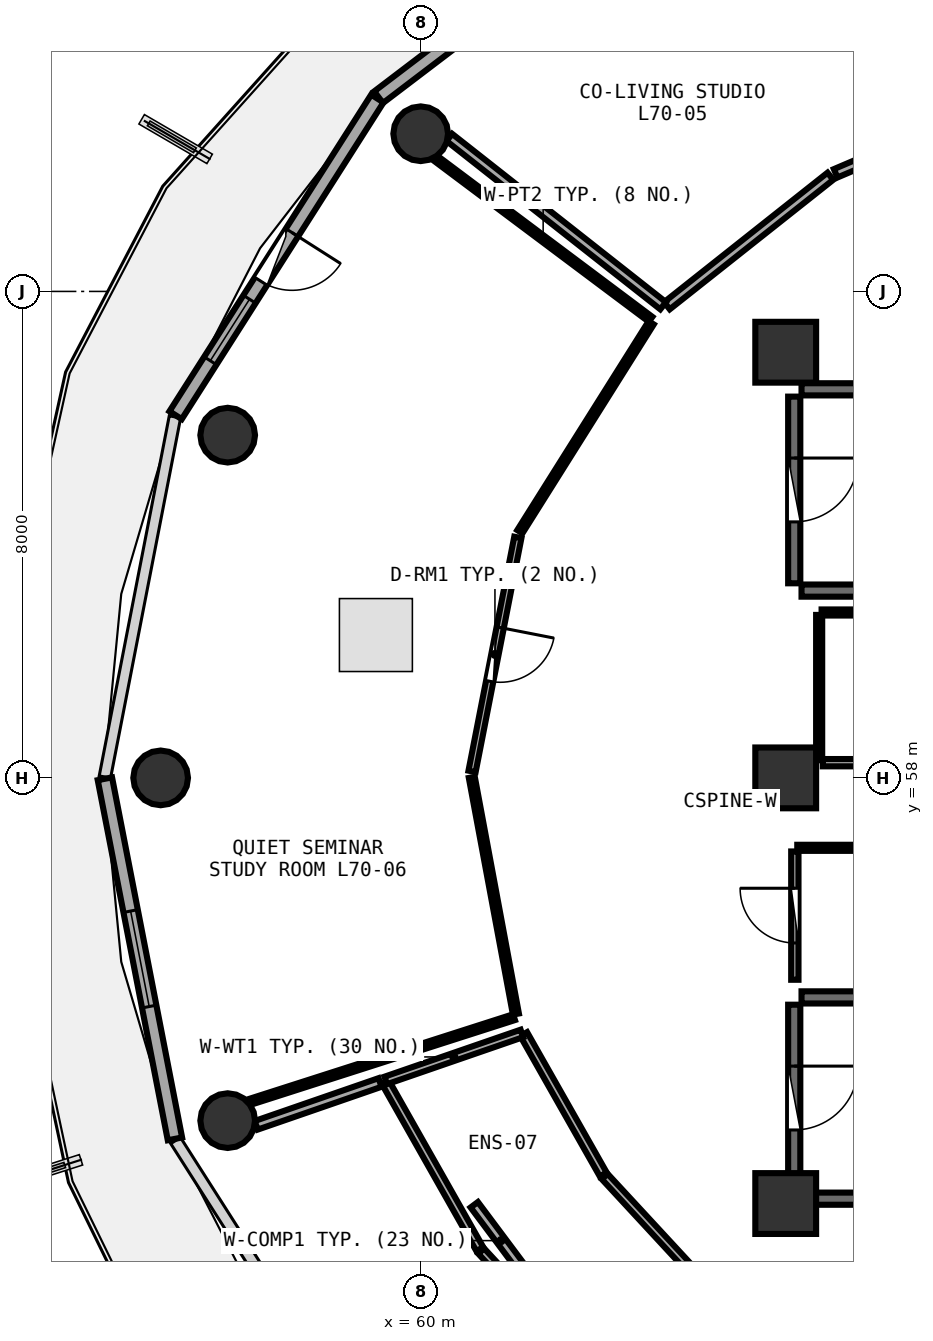
"""IFC4 building model, lengths in metres.
Left out: names, types, materials, properties, quantities, classifications, styles, units other than length and angle.
Written with IfcOpenShell. Run it as: python <this file> out.ifc"""

import sys

from ifc_helpers import new_model, si_unit, direction, frame, frame_2d, origin, origin_2d, place, context, subcontext, project, spatial, rectangle, circle, extrude, element, fill, save


model = new_model("IFC4")
c1 = context("Model", 3, precision=1e-05, world=origin(), true_north=direction((0.0, 1.0)))
c2 = subcontext(c1, "Body", "Model", "MODEL_VIEW")
j1 = project(units=[si_unit("LENGTHUNIT", "METRE"), si_unit("PLANEANGLEUNIT", "RADIAN")], contexts=[c1])
p1 = place(None, origin())
s1 = spatial("IfcSite", under=j1, at=p1, CompositionType="ELEMENT")
p2 = place(p1, origin())
s2 = spatial("IfcBuilding", under=s1, at=p2, CompositionType="ELEMENT")
p3 = place(p2, frame((0.0, 0.0, 274.95)))
s3 = spatial("IfcBuildingStorey", under=s2, at=p3, CompositionType="ELEMENT", Elevation=274.95)
for number, where, z_axis, x_axis in (
    (1, (66.0, 51.0, 0.0), (0.0, 0.0, 1.0), (1.0, 0.0, 0.0)),
    (2, (66.0, 65.0, 0.0), (0.0, 0.0, 1.0), (1.0, 0.0, 0.0)),
    (3, (66.0, 58.0, 0.0), (0.0, 0.0, 1.0), (1.0, 0.0, 0.0)),
):
    element("IfcColumn", number, at=place(p3, frame(where, z_axis=z_axis, x_axis=x_axis)), inside=s3, PredefinedType="PILASTER", context=c2, shape_type="SweptSolid", body=[
        extrude(rectangle(XDim=1.0, YDim=1.0, at=origin_2d()), origin(), (0.0, 0.0, 1.0), 3.75),
    ])
for number, where, z_axis, x_axis in (
    (4, (59.997, 68.593, 0.0), (0.0, 0.0, 1.0), (1.0, 0.0, 0.0)),
    (5, (56.823, 63.636, 0.0), (0.0, 0.0, 1.0), (1.0, 0.0, 0.0)),
    (6, (55.72, 58.0, 0.0), (0.0, 0.0, 1.0), (1.0, 0.0, 0.0)),
    (7, (56.823, 52.364, 0.0), (0.0, 0.0, 1.0), (1.0, 0.0, 0.0)),
):
    element("IfcColumn", number, at=place(p3, frame(where, z_axis=z_axis, x_axis=x_axis)), inside=s3, PredefinedType="COLUMN", context=c2, shape_type="SweptSolid", body=[
        extrude(circle(Radius=0.45, at=origin_2d()), origin(), (0.0, 0.0, 1.0), 3.75),
    ])
p4 = place(p3, frame((64.388, 73.06, 0.0), z_axis=(0.0, 0.0, 1.0), x_axis=(-0.796010444211, -0.605282886514, 0.0)))
e8 = element("IfcWall", 8, at=p4, inside=s3, PredefinedType="SOLIDWALL", context=c2, shape_type="SweptSolid", body=[
    extrude(rectangle(XDim=6.387, YDim=0.24, at=frame_2d((3.194, 0.0))), origin(), (0.0, 0.0, 1.0), 3.475),
])
p5 = place(p4, frame((2.394, 0.0, 0.85)))
e9 = element("IfcOpeningElement", 9, at=p5, cuts=e8, PredefinedType="OPENING", context=c2, shape_type="SweptSolid", body=[
    extrude(rectangle(XDim=1.6, YDim=1.45, at=frame_2d((0.8, 0.725))), frame((0.0, 0.13, 0.0), z_axis=(0.0, -1.0, 0.0), x_axis=(1.0, 0.0, 0.0)), (0.0, 0.0, 1.0), 0.26),
])
p6 = place(p3, frame((59.284, 69.172, 0.0), z_axis=(0.0, 0.0, 1.0), x_axis=(-0.537271968456, -0.843409053728, 0.0)))
e10 = element("IfcWall", 10, at=p6, inside=s3, PredefinedType="SOLIDWALL", context=c2, shape_type="SweptSolid", body=[
    extrude(rectangle(XDim=6.175, YDim=0.24, at=frame_2d((3.087, 0.0))), origin(), (0.0, 0.0, 1.0), 3.475),
])
p7 = place(p6, frame((2.613, 0.0, 0.0)))
e11 = element("IfcOpeningElement", 11, at=p7, cuts=e10, PredefinedType="OPENING", context=c2, shape_type="SweptSolid", body=[
    extrude(rectangle(XDim=0.95, YDim=2.1, at=frame_2d((0.475, 1.05))), frame((0.0, 0.13, 0.0), z_axis=(0.0, -1.0, 0.0), x_axis=(1.0, 0.0, 0.0)), (0.0, 0.0, 1.0), 0.26),
])
p8 = place(p6, frame((3.913, 0.0, 0.85)))
e12 = element("IfcOpeningElement", 12, at=p8, cuts=e10, PredefinedType="OPENING", context=c2, shape_type="SweptSolid", body=[
    extrude(rectangle(XDim=1.2, YDim=1.45, at=frame_2d((0.6, 0.725))), frame((0.0, 0.13, 0.0), z_axis=(0.0, -1.0, 0.0), x_axis=(1.0, 0.0, 0.0)), (0.0, 0.0, 1.0), 0.26),
])
p9 = place(p3, frame((54.803, 57.985, 0.0), z_axis=(0.0, 0.0, 1.0), x_axis=(0.190969309115, -0.981596008028, 0.0)))
e13 = element("IfcWall", 13, at=p9, inside=s3, PredefinedType="SOLIDWALL", context=c2, shape_type="SweptSolid", body=[
    extrude(rectangle(XDim=6.033, YDim=0.24, at=frame_2d((3.017, 0.0))), origin(), (0.0, 0.0, 1.0), 3.475),
])
p10 = place(p9, frame((2.216, 0.0, 0.85)))
e14 = element("IfcOpeningElement", 14, at=p10, cuts=e13, PredefinedType="OPENING", context=c2, shape_type="SweptSolid", body=[
    extrude(rectangle(XDim=1.6, YDim=1.45, at=frame_2d((0.8, 0.725))), frame((0.0, 0.13, 0.0), z_axis=(0.0, -1.0, 0.0), x_axis=(1.0, 0.0, 0.0)), (0.0, 0.0, 1.0), 0.26),
])
for number, where, z_axis, x_axis in (
    (15, (66.26, 61.08, 0.0), (0.0, 0.0, 1.0), (1.0, 0.0, 0.0)),
    (16, (73.42, 64.39, 0.0), (0.0, 0.0, 1.0), (-1.0, 0.0, 0.0)),
):
    element("IfcWall", number, at=place(p3, frame(where, z_axis=z_axis, x_axis=x_axis)), inside=s3, PredefinedType="SHEAR", context=c2, shape_type="SweptSolid", body=[
        extrude(rectangle(XDim=7.16, YDim=0.2, at=frame_2d((3.58, 0.0))), origin(), (0.0, 0.0, 1.0), 3.49),
    ])
p11 = place(p3, frame((66.14, 64.27, 0.0), z_axis=(0.0, 0.0, 1.0), x_axis=(0.0, -1.0, 0.0)))
e17 = element("IfcWall", 17, at=p11, inside=s3, PredefinedType="SHEAR", context=c2, shape_type="SweptSolid", body=[
    extrude(rectangle(XDim=3.07, YDim=0.2, at=frame_2d((1.535, 0.0))), origin(), (0.0, 0.0, 1.0), 3.49),
])
p12 = place(p11, frame((1.01, 0.0, 0.0)))
e18 = element("IfcOpeningElement", 18, at=p12, cuts=e17, PredefinedType="OPENING", context=c2, shape_type="SweptSolid", body=[
    extrude(rectangle(XDim=1.05, YDim=2.1, at=frame_2d((0.525, 1.05))), frame((0.0, 0.11, 0.0), z_axis=(0.0, -1.0, 0.0), x_axis=(1.0, 0.0, 0.0)), (0.0, 0.0, 1.0), 0.22),
])
for number, where, z_axis, x_axis in (
    (19, (66.26, 51.08, 0.0), (0.0, 0.0, 1.0), (1.0, 0.0, 0.0)),
    (20, (73.42, 54.39, 0.0), (0.0, 0.0, 1.0), (-1.0, 0.0, 0.0)),
):
    element("IfcWall", number, at=place(p3, frame(where, z_axis=z_axis, x_axis=x_axis)), inside=s3, PredefinedType="SHEAR", context=c2, shape_type="SweptSolid", body=[
        extrude(rectangle(XDim=7.16, YDim=0.2, at=frame_2d((3.58, 0.0))), origin(), (0.0, 0.0, 1.0), 3.49),
    ])
p13 = place(p3, frame((66.14, 54.27, 0.0), z_axis=(0.0, 0.0, 1.0), x_axis=(0.0, -1.0, 0.0)))
e21 = element("IfcWall", 21, at=p13, inside=s3, PredefinedType="SHEAR", context=c2, shape_type="SweptSolid", body=[
    extrude(rectangle(XDim=3.07, YDim=0.2, at=frame_2d((1.535, 0.0))), origin(), (0.0, 0.0, 1.0), 3.49),
])
p14 = place(p13, frame((1.01, 0.0, 0.0)))
e22 = element("IfcOpeningElement", 22, at=p14, cuts=e21, PredefinedType="OPENING", context=c2, shape_type="SweptSolid", body=[
    extrude(rectangle(XDim=1.05, YDim=2.1, at=frame_2d((0.525, 1.05))), frame((0.0, 0.11, 0.0), z_axis=(0.0, -1.0, 0.0), x_axis=(1.0, 0.0, 0.0)), (0.0, 0.0, 1.0), 0.22),
])
p15 = place(p3, frame((66.61, 58.25, 0.0), z_axis=(0.0, 0.0, 1.0), x_axis=(1.0, 0.0, 0.0)))
e23 = element("IfcWall", 23, at=p15, inside=s3, PredefinedType="PARTITIONING", context=c2, shape_type="SweptSolid", body=[
    extrude(rectangle(XDim=5.78, YDim=0.12, at=frame_2d((2.89, 0.0))), origin(), (0.0, 0.0, 1.0), 3.48),
])
p16 = place(p15, frame((2.44, 0.0, 0.0)))
e24 = element("IfcOpeningElement", 24, at=p16, cuts=e23, PredefinedType="OPENING", context=c2, shape_type="SweptSolid", body=[
    extrude(rectangle(XDim=0.9, YDim=2.08, at=frame_2d((0.45, 1.04))), frame((0.0, 0.07, 0.0), z_axis=(0.0, -1.0, 0.0), x_axis=(1.0, 0.0, 0.0)), (0.0, 0.0, 1.0), 0.14),
])
p17 = place(p3, frame((66.15, 54.68, 0.0), z_axis=(0.0, 0.0, 1.0), x_axis=(0.0, 1.0, 0.0)))
e25 = element("IfcWall", 25, at=p17, inside=s3, PredefinedType="PARTITIONING", context=c2, shape_type="SweptSolid", body=[
    extrude(rectangle(XDim=2.11, YDim=0.12, at=frame_2d((1.055, 0.0))), origin(), (0.0, 0.0, 1.0), 2.775),
])
p18 = place(p17, frame((0.605, 0.0, 0.0)))
e26 = element("IfcOpeningElement", 26, at=p18, cuts=e25, PredefinedType="OPENING", context=c2, shape_type="SweptSolid", body=[
    extrude(rectangle(XDim=0.9, YDim=2.08, at=frame_2d((0.45, 1.04))), frame((0.0, 0.07, 0.0), z_axis=(0.0, -1.0, 0.0), x_axis=(1.0, 0.0, 0.0)), (0.0, 0.0, 1.0), 0.14),
])
p19 = place(p3, frame((70.021, 69.308, 0.0), z_axis=(0.0, 0.0, 1.0), x_axis=(-0.919764656354, -0.392470351647, 0.0)))
e27 = element("IfcWall", 27, at=p19, inside=s3, PredefinedType="PARTITIONING", context=c2, shape_type="SweptSolid", body=[
    extrude(rectangle(XDim=3.479, YDim=0.15, at=frame_2d((1.739, 0.0))), origin(), (0.0, 0.0, 1.0), 3.235),
])
p20 = place(p19, frame((1.264, 0.0, 0.0)))
e28 = element("IfcOpeningElement", 28, at=p20, cuts=e27, PredefinedType="OPENING", context=c2, shape_type="SweptSolid", body=[
    extrude(rectangle(XDim=0.95, YDim=2.08, at=frame_2d((0.475, 1.04))), frame((0.0, 0.085, 0.0), z_axis=(0.0, -1.0, 0.0), x_axis=(1.0, 0.0, 0.0)), (0.0, 0.0, 1.0), 0.17),
])
p21 = place(p3, frame((61.594, 61.955, 0.0), z_axis=(0.0, 0.0, 1.0), x_axis=(-0.192019428236, -0.981391124466, 0.0)))
e29 = element("IfcWall", 29, at=p21, inside=s3, PredefinedType="PARTITIONING", context=c2, shape_type="SweptSolid", body=[
    extrude(rectangle(XDim=3.921, YDim=0.12, at=frame_2d((1.96, 0.0))), origin(), (0.0, 0.0, 1.0), 3.075),
])
p22 = place(p21, frame((1.511, 0.0, 0.0)))
e30 = element("IfcOpeningElement", 30, at=p22, cuts=e29, PredefinedType="OPENING", context=c2, shape_type="SweptSolid", body=[
    extrude(rectangle(XDim=0.9, YDim=2.08, at=frame_2d((0.45, 1.04))), frame((0.0, 0.07, 0.0), z_axis=(0.0, -1.0, 0.0), x_axis=(1.0, 0.0, 0.0)), (0.0, 0.0, 1.0), 0.14),
])
p23 = place(p3, frame((72.41, 60.72, 0.0), z_axis=(0.0, 0.0, 1.0), x_axis=(-1.0, 0.0, 0.0)))
e31 = element("IfcWall", 31, at=p23, inside=s3, PredefinedType="PARTITIONING", context=c2, shape_type="SweptSolid", body=[
    extrude(rectangle(XDim=5.82, YDim=0.1, at=frame_2d((2.91, 0.0))), origin(), (0.0, 0.0, 1.0), 3.48),
])
p24 = place(p3, frame((66.55, 60.68, 0.0), z_axis=(0.0, 0.0, 1.0), x_axis=(0.0, -1.0, 0.0)))
e32 = element("IfcWall", 32, at=p24, inside=s3, PredefinedType="PARTITIONING", context=c2, shape_type="SweptSolid", body=[
    extrude(rectangle(XDim=2.39, YDim=0.1, at=frame_2d((1.195, 0.0))), origin(), (0.0, 0.0, 1.0), 3.48),
])
p25 = place(p3, frame((71.76, 56.85, 0.0), z_axis=(0.0, 0.0, 1.0), x_axis=(-1.0, 0.0, 0.0)))
e33 = element("IfcWall", 33, at=p25, inside=s3, PredefinedType="PARTITIONING", context=c2, shape_type="SweptSolid", body=[
    extrude(rectangle(XDim=5.57, YDim=0.1, at=frame_2d((2.785, 0.0))), origin(), (0.0, 0.0, 1.0), 2.775),
])
p26 = place(p3, frame((66.735, 67.894, 0.0), z_axis=(0.0, 0.0, 1.0), x_axis=(-0.78387401132, -0.620919909793, 0.0)))
e34 = element("IfcWall", 34, at=p26, inside=s3, PredefinedType="PARTITIONING", context=c2, shape_type="SweptSolid", body=[
    extrude(rectangle(XDim=3.429, YDim=0.15, at=frame_2d((1.715, 0.0))), origin(), (0.0, 0.0, 1.0), 3.075),
])
p27 = place(p3, frame((63.984, 65.765, 0.0), z_axis=(0.0, 0.0, 1.0), x_axis=(-0.785736749878, 0.618561039745, 0.0)))
e35 = element("IfcWall", 35, at=p27, inside=s3, PredefinedType="PARTITIONING", context=c2, shape_type="SweptSolid", body=[
    extrude(rectangle(XDim=4.475, YDim=0.15, at=frame_2d((2.237, 0.0))), origin(), (0.0, 0.0, 1.0), 3.075),
])
p28 = place(p3, frame((63.788, 65.484, 0.0), z_axis=(0.0, 0.0, 1.0), x_axis=(-0.532251611419, -0.846586216603, 0.0)))
e36 = element("IfcWall", 36, at=p28, inside=s3, PredefinedType="PARTITIONING", context=c2, shape_type="SweptSolid", body=[
    extrude(rectangle(XDim=4.059, YDim=0.1, at=frame_2d((2.03, 0.0))), origin(), (0.0, 0.0, 1.0), 3.075),
])
p29 = place(p3, frame((60.837, 58.009, 0.0), z_axis=(0.0, 0.0, 1.0), x_axis=(0.18318648267, -0.983078182327, 0.0)))
e37 = element("IfcWall", 37, at=p29, inside=s3, PredefinedType="PARTITIONING", context=c2, shape_type="SweptSolid", body=[
    extrude(rectangle(XDim=3.959, YDim=0.1, at=frame_2d((1.98, 0.0))), origin(), (0.0, 0.0, 1.0), 3.075),
])
p30 = place(p3, frame((61.532, 54.065, 0.0), z_axis=(0.0, 0.0, 1.0), x_axis=(-0.95227750557, -0.305233602976, 0.0)))
e38 = element("IfcWall", 38, at=p30, inside=s3, PredefinedType="PARTITIONING", context=c2, shape_type="SweptSolid", body=[
    extrude(rectangle(XDim=4.565, YDim=0.1, at=frame_2d((2.283, 0.0))), origin(), (0.0, 0.0, 1.0), 3.175),
])
p31 = place(p3, frame((60.244, 68.188, 0.0), z_axis=(0.0, 0.0, 1.0), x_axis=(0.800384816546, -0.599486568191, 0.0)))
e39 = element("IfcWall", 39, at=p31, inside=s3, PredefinedType="PARTITIONING", context=c2, shape_type="SweptSolid", body=[
    extrude(rectangle(XDim=4.414, YDim=0.1, at=frame_2d((2.207, 0.0))), origin(), (0.0, 0.0, 1.0), 3.175),
])
p32 = place(p3, frame((61.69, 53.787, 0.0), z_axis=(0.0, 0.0, 1.0), x_axis=(0.493265362099, -0.86987888959, 0.0)))
e40 = element("IfcWall", 40, at=p32, inside=s3, PredefinedType="PLUMBINGWALL", context=c2, shape_type="SweptSolid", body=[
    extrude(rectangle(XDim=2.656, YDim=0.13, at=frame_2d((1.328, 0.0))), origin(), (0.0, 0.0, 1.0), 3.075),
])
p33 = place(p3, frame((63.024, 51.444, 0.0), z_axis=(0.0, 0.0, 1.0), x_axis=(0.678981447207, -0.734155429285, 0.0)))
e41 = element("IfcWall", 41, at=p33, inside=s3, PredefinedType="PLUMBINGWALL", context=c2, shape_type="SweptSolid", body=[
    extrude(rectangle(XDim=2.717, YDim=0.13, at=frame_2d((1.358, 0.0))), origin(), (0.0, 0.0, 1.0), 3.075),
])
p34 = place(p3, frame((63.183, 47.845, 0.0), z_axis=(0.0, 0.0, 1.0), x_axis=(-0.678233011032, 0.734846911095, 0.0)))
e42 = element("IfcWall", 42, at=p34, inside=s3, PredefinedType="PLUMBINGWALL", context=c2, shape_type="SweptSolid", body=[
    extrude(rectangle(XDim=3.23, YDim=0.13, at=frame_2d((1.615, 0.0))), origin(), (0.0, 0.0, 1.0), 3.075),
])
p35 = place(p3, frame((60.969, 50.25, 0.0), z_axis=(0.0, 0.0, 1.0), x_axis=(-0.492548536898, 0.870284975626, 0.0)))
e43 = element("IfcWall", 43, at=p35, inside=s3, PredefinedType="PLUMBINGWALL", context=c2, shape_type="SweptSolid", body=[
    extrude(rectangle(XDim=3.16, YDim=0.13, at=frame_2d((1.58, 0.0))), origin(), (0.0, 0.0, 1.0), 3.075),
])
p36 = place(p3, frame((59.422, 53.024, 0.0), z_axis=(0.0, 0.0, 1.0), x_axis=(0.945238193125, 0.326381308071, 0.0)))
e44 = element("IfcWall", 44, at=p36, inside=s3, PredefinedType="PLUMBINGWALL", context=c2, shape_type="SweptSolid", body=[
    extrude(rectangle(XDim=2.369, YDim=0.13, at=frame_2d((1.185, 0.0))), origin(), (0.0, 0.0, 1.0), 3.175),
])
p37 = place(p3, frame((57.291, 52.287, 0.0), z_axis=(0.0, 0.0, 1.0), x_axis=(0.945101825102, 0.326775978598, 0.0)))
e45 = element("IfcWall", 45, at=p37, inside=s3, PredefinedType="PARTITIONING", context=c2, shape_type="SweptSolid", body=[
    extrude(rectangle(XDim=2.156, YDim=0.15, at=frame_2d((1.078, 0.0))), origin(), (0.0, 0.0, 1.0), 3.075),
])
p38 = place(p3, frame((60.878, 50.98, 0.0), z_axis=(0.0, 0.0, 1.0), x_axis=(0.598540360971, -0.801092651501, 0.0)))
e46 = element("IfcWall", 46, at=p38, inside=s3, PredefinedType="PARTITIONING", context=c2, shape_type="SweptSolid", body=[
    extrude(rectangle(XDim=1.473, YDim=0.15, at=frame_2d((0.736, 0.0))), origin(), (0.0, 0.0, 1.0), 3.175),
])
p39 = place(p7, frame((0.95, 0.0, 0.0), z_axis=(0.0, 0.0, 1.0), x_axis=(-1.0, 0.0, 0.0)))
e47 = element("IfcDoor", 47, at=p39, inside=s3, OperationType="SINGLE_SWING_RIGHT", PredefinedType="DOOR", context=c2, shape_type="SweptSolid", body=[
    extrude(rectangle(XDim=0.95, YDim=2.1, at=frame_2d((0.475, 1.05))), frame((0.0, 0.025, 0.0), z_axis=(0.0, -1.0, 0.0), x_axis=(1.0, 0.0, 0.0)), (0.0, 0.0, 1.0), 0.05),
])
fill(e11, e47)
p40 = place(p8, origin())
e48 = element("IfcWindow", 48, at=p40, inside=s3, PartitioningType="SINGLE_PANEL", PredefinedType="WINDOW", context=c2, shape_type="SweptSolid", body=[
    extrude(rectangle(XDim=1.2, YDim=1.45, at=frame_2d((0.6, 0.725))), frame((0.0, 0.03, 0.0), z_axis=(0.0, -1.0, 0.0), x_axis=(1.0, 0.0, 0.0)), (0.0, 0.0, 1.0), 0.06),
])
fill(e12, e48)
p41 = place(p10, origin())
e49 = element("IfcWindow", 49, at=p41, inside=s3, PartitioningType="SINGLE_PANEL", PredefinedType="WINDOW", context=c2, shape_type="SweptSolid", body=[
    extrude(rectangle(XDim=1.6, YDim=1.45, at=frame_2d((0.8, 0.725))), frame((0.0, 0.03, 0.0), z_axis=(0.0, -1.0, 0.0), x_axis=(1.0, 0.0, 0.0)), (0.0, 0.0, 1.0), 0.06),
])
fill(e14, e49)
p42 = place(p12, origin())
e50 = element("IfcDoor", 50, at=p42, inside=s3, OperationType="SINGLE_SWING_LEFT", PredefinedType="DOOR", context=c2, shape_type="SweptSolid", body=[
    extrude(rectangle(XDim=1.05, YDim=2.1, at=frame_2d((0.525, 1.05))), frame((0.0, 0.025, 0.0), z_axis=(0.0, -1.0, 0.0), x_axis=(1.0, 0.0, 0.0)), (0.0, 0.0, 1.0), 0.05),
])
fill(e18, e50)
p43 = place(p14, origin())
e51 = element("IfcDoor", 51, at=p43, inside=s3, OperationType="SINGLE_SWING_LEFT", PredefinedType="DOOR", context=c2, shape_type="SweptSolid", body=[
    extrude(rectangle(XDim=1.05, YDim=2.1, at=frame_2d((0.525, 1.05))), frame((0.0, 0.025, 0.0), z_axis=(0.0, -1.0, 0.0), x_axis=(1.0, 0.0, 0.0)), (0.0, 0.0, 1.0), 0.05),
])
fill(e22, e51)
p44 = place(p18, origin())
e52 = element("IfcDoor", 52, at=p44, inside=s3, OperationType="SINGLE_SWING_RIGHT", PredefinedType="DOOR", context=c2, shape_type="SweptSolid", body=[
    extrude(rectangle(XDim=0.9, YDim=2.08, at=frame_2d((0.45, 1.04))), frame((0.0, 0.025, 0.0), z_axis=(0.0, -1.0, 0.0), x_axis=(1.0, 0.0, 0.0)), (0.0, 0.0, 1.0), 0.05),
])
fill(e26, e52)
p45 = place(p22, origin())
e53 = element("IfcDoor", 53, at=p45, inside=s3, OperationType="SINGLE_SWING_LEFT", PredefinedType="DOOR", context=c2, shape_type="SweptSolid", body=[
    extrude(rectangle(XDim=0.9, YDim=2.08, at=frame_2d((0.45, 1.04))), frame((0.0, 0.025, 0.0), z_axis=(0.0, -1.0, 0.0), x_axis=(1.0, 0.0, 0.0)), (0.0, 0.0, 1.0), 0.05),
])
fill(e30, e53)
save(model, sys.argv[1])
